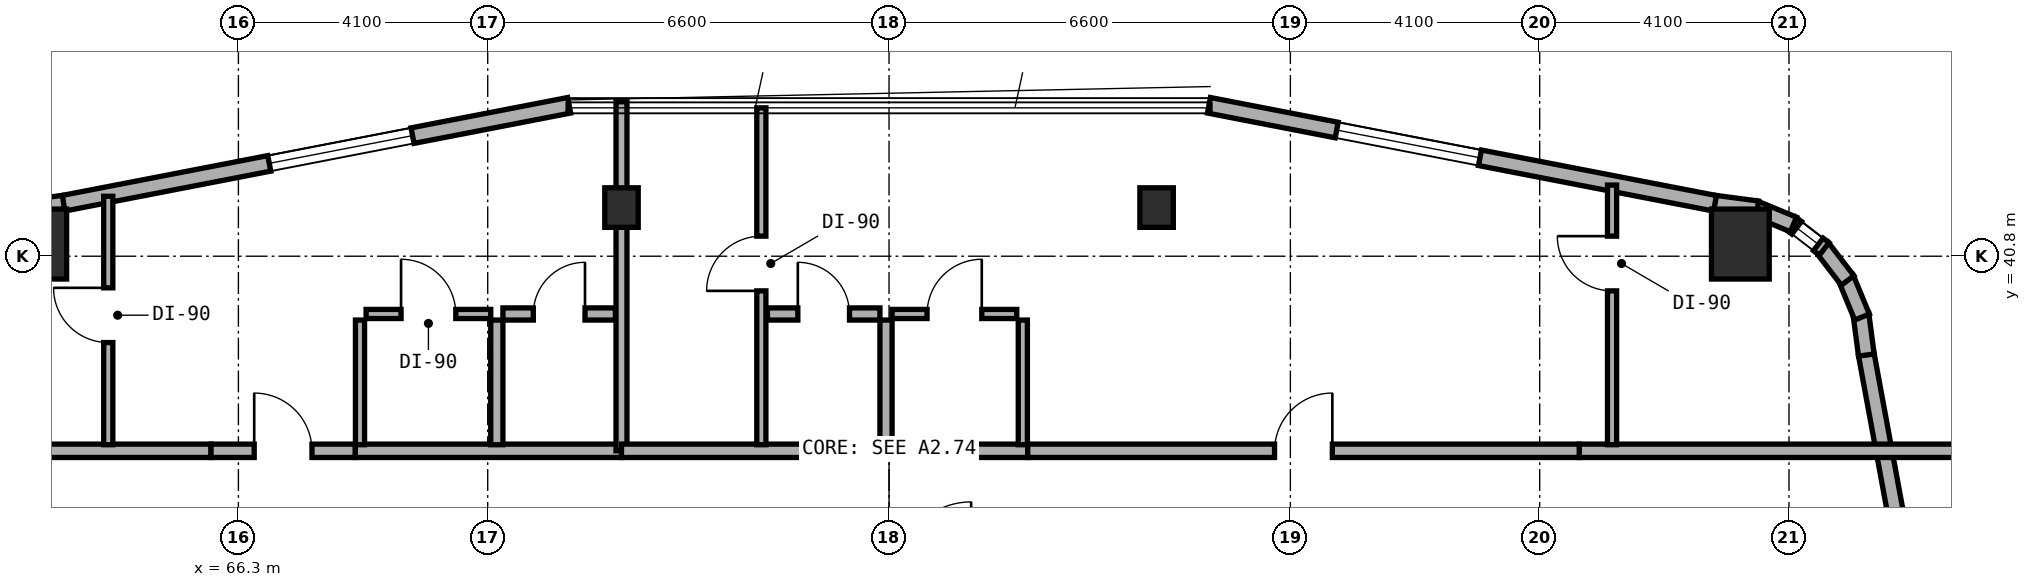
"""IFC4 building model, lengths in metres.
Left out: names, types, materials, properties, quantities, classifications, styles, units other than length and angle.
Written with IfcOpenShell. Run it as: python <this file> out.ifc"""

import sys

from ifc_helpers import new_model, si_unit, direction, frame, frame_2d, origin, origin_2d, place, context, subcontext, project, spatial, rectangle, extrude, element, fill, save


model = new_model("IFC4")
c1 = context("Model", 3, precision=1e-05, world=origin(), true_north=direction((0.0, 1.0)))
c2 = subcontext(c1, "Body", "Model", "MODEL_VIEW")
j1 = project(units=[si_unit("LENGTHUNIT", "METRE"), si_unit("PLANEANGLEUNIT", "RADIAN")], contexts=[c1])
p1 = place(None, origin())
s1 = spatial("IfcSite", under=j1, at=p1, CompositionType="ELEMENT")
p2 = place(p1, origin())
s2 = spatial("IfcBuilding", under=s1, at=p2, CompositionType="ELEMENT")
p3 = place(p2, frame((0.0, 0.0, 127.5)))
s3 = spatial("IfcBuildingStorey", under=s2, at=p3, CompositionType="ELEMENT", Elevation=127.5)
for number, where, z_axis, x_axis in (
    (1, (72.6, 41.6, 0.0), (0.0, 0.0, 1.0), (1.0, 0.0, 0.0)),
    (2, (81.4, 41.6, 0.0), (0.0, 0.0, 1.0), (1.0, 0.0, 0.0)),
):
    element("IfcColumn", number, at=place(p3, frame(where, z_axis=z_axis, x_axis=x_axis)), inside=s3, PredefinedType="COLUMN", context=c2, shape_type="SweptSolid", body=[
        extrude(rectangle(XDim=0.55, YDim=0.65, at=origin_2d()), origin(), (0.0, 0.0, 1.0), 3.24),
    ])
for number, where, z_axis, x_axis in (
    (3, (91.0, 41.0, 0.0), (0.0, 0.0, 1.0), (1.0, 0.0, 0.0)),
    (4, (63.0, 41.0, 0.0), (0.0, 0.0, 1.0), (1.0, 0.0, 0.0)),
):
    element("IfcColumn", number, at=place(p3, frame(where, z_axis=z_axis, x_axis=x_axis)), inside=s3, PredefinedType="COLUMN", context=c2, shape_type="SweptSolid", body=[
        extrude(rectangle(XDim=0.95, YDim=1.15, at=origin_2d()), origin(), (0.0, 0.0, 1.0), 3.24),
    ])
p4 = place(p3, frame((94.682, 30.442, 0.0), z_axis=(0.0, 0.0, 1.0), x_axis=(-0.181209963057, 0.983444431215, 0.0)))
e5 = element("IfcWall", 5, at=p4, inside=s3, PredefinedType="STANDARD", context=c2, shape_type="SweptSolid", body=[
    extrude(rectangle(XDim=8.889, YDim=0.26, at=frame_2d((4.445, 0.0))), origin(), (0.0, 0.0, 1.0), 3.25),
])
p5 = place(p4, frame((1.444, 0.0, 0.8)))
e6 = element("IfcOpeningElement", 6, at=p5, cuts=e5, PredefinedType="OPENING", context=c2, shape_type="SweptSolid", body=[
    extrude(rectangle(XDim=2.4, YDim=1.6, at=frame_2d((1.2, 0.8))), frame((0.0, 0.14, 0.0), z_axis=(0.0, -1.0, 0.0), x_axis=(1.0, 0.0, 0.0)), (0.0, 0.0, 1.0), 0.28),
])
p6 = place(p3, frame((93.072, 39.175, 0.0), z_axis=(0.0, 0.0, 1.0), x_axis=(-0.131667498923, 0.991293937098, 0.0)))
e7 = element("IfcWall", 7, at=p6, inside=s3, PredefinedType="STANDARD", context=c2, shape_type="SweptSolid", body=[
    extrude(rectangle(XDim=0.677, YDim=0.26, at=frame_2d((0.338, 0.0))), origin(), (0.0, 0.0, 1.0), 3.25),
])
p7 = place(p3, frame((93.001, 39.8, 0.0), z_axis=(0.0, 0.0, 1.0), x_axis=(-0.381988976935, 0.924166879681, 0.0)))
e8 = element("IfcWall", 8, at=p7, inside=s3, PredefinedType="STANDARD", context=c2, shape_type="SweptSolid", body=[
    extrude(rectangle(XDim=0.693, YDim=0.26, at=frame_2d((0.347, 0.0))), origin(), (0.0, 0.0, 1.0), 3.25),
])
p8 = place(p3, frame((92.764, 40.401, 0.0), z_axis=(0.0, 0.0, 1.0), x_axis=(-0.609472651958, 0.792807092876, 0.0)))
e9 = element("IfcWall", 9, at=p8, inside=s3, PredefinedType="STANDARD", context=c2, shape_type="SweptSolid", body=[
    extrude(rectangle(XDim=0.694, YDim=0.26, at=frame_2d((0.347, 0.0))), origin(), (0.0, 0.0, 1.0), 3.25),
])
p9 = place(p3, frame((92.379, 40.92, 0.0), z_axis=(0.0, 0.0, 1.0), x_axis=(-0.792506234191, 0.609863811657, 0.0)))
e10 = element("IfcWall", 10, at=p9, inside=s3, PredefinedType="STANDARD", context=c2, shape_type="SweptSolid", body=[
    extrude(rectangle(XDim=0.694, YDim=0.26, at=frame_2d((0.347, 0.0))), origin(), (0.0, 0.0, 1.0), 3.25),
])
p10 = place(p9, frame((0.122, 0.0, 0.85)))
e11 = element("IfcOpeningElement", 11, at=p10, cuts=e10, PredefinedType="OPENING", context=c2, shape_type="SweptSolid", body=[
    extrude(rectangle(XDim=0.45, YDim=1.5, at=frame_2d((0.225, 0.75))), frame((0.0, 0.14, 0.0), z_axis=(0.0, -1.0, 0.0), x_axis=(1.0, 0.0, 0.0)), (0.0, 0.0, 1.0), 0.28),
])
p11 = place(p3, frame((91.873, 41.322, 0.0), z_axis=(0.0, 0.0, 1.0), x_axis=(-0.92421822618, 0.381864727877, 0.0)))
e12 = element("IfcWall", 12, at=p11, inside=s3, PredefinedType="STANDARD", context=c2, shape_type="SweptSolid", body=[
    extrude(rectangle(XDim=0.694, YDim=0.26, at=frame_2d((0.347, 0.0))), origin(), (0.0, 0.0, 1.0), 3.25),
])
p12 = place(p3, frame((91.281, 41.579, 0.0), z_axis=(0.0, 0.0, 1.0), x_axis=(-0.991433279471, 0.130614135366, 0.0)))
e13 = element("IfcWall", 13, at=p12, inside=s3, PredefinedType="STANDARD", context=c2, shape_type="SweptSolid", body=[
    extrude(rectangle(XDim=0.712, YDim=0.26, at=frame_2d((0.356, 0.0))), origin(), (0.0, 0.0, 1.0), 3.25),
])
p13 = place(p3, frame((90.583, 41.67, 0.0), z_axis=(0.0, 0.0, 1.0), x_axis=(-0.981750199588, 0.190175039396, 0.0)))
e14 = element("IfcWall", 14, at=p13, inside=s3, PredefinedType="STANDARD", context=c2, shape_type="SweptSolid", body=[
    extrude(rectangle(XDim=8.477, YDim=0.26, at=frame_2d((4.238, 0.0))), origin(), (0.0, 0.0, 1.0), 3.25),
])
p14 = place(p13, frame((3.937, 0.0, 0.8)))
e15 = element("IfcOpeningElement", 15, at=p14, cuts=e14, PredefinedType="OPENING", context=c2, shape_type="SweptSolid", body=[
    extrude(rectangle(XDim=2.4, YDim=1.6, at=frame_2d((1.2, 0.8))), frame((0.0, 0.14, 0.0), z_axis=(0.0, -1.0, 0.0), x_axis=(1.0, 0.0, 0.0)), (0.0, 0.0, 1.0), 0.28),
])
p15 = place(p3, frame((71.739, 43.282, 0.0), z_axis=(0.0, 0.0, 1.0), x_axis=(-0.981750199588, -0.190175039396, 0.0)))
e16 = element("IfcWall", 16, at=p15, inside=s3, PredefinedType="STANDARD", context=c2, shape_type="SweptSolid", body=[
    extrude(rectangle(XDim=8.477, YDim=0.26, at=frame_2d((4.238, 0.0))), origin(), (0.0, 0.0, 1.0), 3.25),
])
p16 = place(p15, frame((2.623, 0.0, 0.8)))
e17 = element("IfcOpeningElement", 17, at=p16, cuts=e16, PredefinedType="OPENING", context=c2, shape_type="SweptSolid", body=[
    extrude(rectangle(XDim=2.4, YDim=1.6, at=frame_2d((1.2, 0.8))), frame((0.0, 0.14, 0.0), z_axis=(0.0, -1.0, 0.0), x_axis=(1.0, 0.0, 0.0)), (0.0, 0.0, 1.0), 0.28),
])
p17 = place(p3, frame((63.425, 41.672, 0.0), z_axis=(0.0, 0.0, 1.0), x_axis=(-0.991300187529, -0.13162043232, 0.0)))
e18 = element("IfcWall", 18, at=p17, inside=s3, PredefinedType="STANDARD", context=c2, shape_type="SweptSolid", body=[
    extrude(rectangle(XDim=0.677, YDim=0.26, at=frame_2d((0.338, 0.0))), origin(), (0.0, 0.0, 1.0), 3.25),
])
p18 = place(p3, frame((59.36, 37.6, 0.0), z_axis=(0.0, 0.0, 1.0), x_axis=(1.0, 0.0, 0.0)))
e19 = element("IfcWall", 19, at=p18, inside=s3, PredefinedType="SOLIDWALL", context=c2, shape_type="SweptSolid", body=[
    extrude(rectangle(XDim=6.49, YDim=0.22, at=frame_2d((3.245, 0.0))), origin(), (0.0, 0.0, 1.0), 2.815),
])
p19 = place(p3, frame((68.22, 37.6, 0.0), z_axis=(0.0, 0.0, 1.0), x_axis=(1.0, 0.0, 0.0)))
e20 = element("IfcWall", 20, at=p19, inside=s3, PredefinedType="SOLIDWALL", context=c2, shape_type="SweptSolid", body=[
    extrude(rectangle(XDim=4.38, YDim=0.22, at=frame_2d((2.19, 0.0))), origin(), (0.0, 0.0, 1.0), 3.22),
])
p20 = place(p3, frame((65.85, 37.6, 0.0), z_axis=(0.0, 0.0, 1.0), x_axis=(1.0, 0.0, 0.0)))
e21 = element("IfcWall", 21, at=p20, inside=s3, PredefinedType="SOLIDWALL", context=c2, shape_type="SweptSolid", body=[
    extrude(rectangle(XDim=2.37, YDim=0.22, at=frame_2d((1.185, 0.0))), origin(), (0.0, 0.0, 1.0), 3.22),
])
p21 = place(p20, frame((0.71, 0.0, 0.0)))
e22 = element("IfcOpeningElement", 22, at=p21, cuts=e21, PredefinedType="OPENING", context=c2, shape_type="SweptSolid", body=[
    extrude(rectangle(XDim=0.95, YDim=2.1, at=frame_2d((0.475, 1.05))), frame((0.0, 0.12, 0.0), z_axis=(0.0, -1.0, 0.0), x_axis=(1.0, 0.0, 0.0)), (0.0, 0.0, 1.0), 0.24),
])
p22 = place(p3, frame((64.16, 37.7, 0.0), z_axis=(0.0, 0.0, 1.0), x_axis=(0.0, 1.0, 0.0)))
e23 = element("IfcWall", 23, at=p22, inside=s3, PredefinedType="PARTITIONING", context=c2, shape_type="SweptSolid", body=[
    extrude(rectangle(XDim=4.086, YDim=0.15, at=frame_2d((2.043, 0.0))), origin(), (0.0, 0.0, 1.0), 3.22),
])
p23 = place(p22, frame((1.68, 0.0, 0.0)))
e24 = element("IfcOpeningElement", 24, at=p23, cuts=e23, PredefinedType="OPENING", context=c2, shape_type="SweptSolid", body=[
    extrude(rectangle(XDim=0.9, YDim=2.1, at=frame_2d((0.45, 1.05))), frame((0.0, 0.085, 0.0), z_axis=(0.0, -1.0, 0.0), x_axis=(1.0, 0.0, 0.0)), (0.0, 0.0, 1.0), 0.17),
])
p24 = place(p3, frame((70.55, 37.7, 0.0), z_axis=(0.0, 0.0, 1.0), x_axis=(0.0, 1.0, 0.0)))
e25 = element("IfcWall", 25, at=p24, inside=s3, PredefinedType="PLUMBINGWALL", context=c2, shape_type="SweptSolid", body=[
    extrude(rectangle(XDim=2.05, YDim=0.2, at=frame_2d((1.025, 0.0))), origin(), (0.0, 0.0, 1.0), 3.22),
])
p25 = place(p3, frame((68.3, 37.7, 0.0), z_axis=(0.0, 0.0, 1.0), x_axis=(0.0, 1.0, 0.0)))
e26 = element("IfcWall", 26, at=p25, inside=s3, PredefinedType="PARTITIONING", context=c2, shape_type="SweptSolid", body=[
    extrude(rectangle(XDim=2.05, YDim=0.15, at=frame_2d((1.025, 0.0))), origin(), (0.0, 0.0, 1.0), 3.22),
])
p26 = place(p3, frame((70.65, 39.85, 0.0), z_axis=(0.0, 0.0, 1.0), x_axis=(1.0, 0.0, 0.0)))
e27 = element("IfcWall", 27, at=p26, inside=s3, PredefinedType="PLUMBINGWALL", context=c2, shape_type="SweptSolid", body=[
    extrude(rectangle(XDim=1.85, YDim=0.2, at=frame_2d((0.925, 0.0))), origin(), (0.0, 0.0, 1.0), 3.22),
])
p27 = place(p26, frame((0.5, 0.0, 0.0)))
e28 = element("IfcOpeningElement", 28, at=p27, cuts=e27, PredefinedType="OPENING", context=c2, shape_type="SweptSolid", body=[
    extrude(rectangle(XDim=0.85, YDim=2.1, at=frame_2d((0.425, 1.05))), frame((0.0, 0.11, 0.0), z_axis=(0.0, -1.0, 0.0), x_axis=(1.0, 0.0, 0.0)), (0.0, 0.0, 1.0), 0.22),
])
p28 = place(p3, frame((68.4, 39.85, 0.0), z_axis=(0.0, 0.0, 1.0), x_axis=(1.0, 0.0, 0.0)))
e29 = element("IfcWall", 29, at=p28, inside=s3, PredefinedType="PARTITIONING", context=c2, shape_type="SweptSolid", body=[
    extrude(rectangle(XDim=2.05, YDim=0.15, at=frame_2d((1.025, 0.0))), origin(), (0.0, 0.0, 1.0), 3.22),
])
p29 = place(p28, frame((0.575, 0.0, 0.0)))
e30 = element("IfcOpeningElement", 30, at=p29, cuts=e29, PredefinedType="OPENING", context=c2, shape_type="SweptSolid", body=[
    extrude(rectangle(XDim=0.9, YDim=2.1, at=frame_2d((0.45, 1.05))), frame((0.0, 0.085, 0.0), z_axis=(0.0, -1.0, 0.0), x_axis=(1.0, 0.0, 0.0)), (0.0, 0.0, 1.0), 0.17),
])
p30 = place(p3, frame((72.6, 37.6, 0.0), z_axis=(0.0, 0.0, 1.0), x_axis=(0.0, 1.0, 0.0)))
e31 = element("IfcWall", 31, at=p30, inside=s3, PredefinedType="SOLIDWALL", context=c2, shape_type="SweptSolid", body=[
    extrude(rectangle(XDim=5.74, YDim=0.18, at=frame_2d((2.87, 0.0))), origin(), (0.0, 0.0, 1.0), 3.22),
])
p31 = place(p3, frame((72.6, 37.6, 0.0), z_axis=(0.0, 0.0, 1.0), x_axis=(1.0, 0.0, 0.0)))
e32 = element("IfcWall", 32, at=p31, inside=s3, PredefinedType="SOLIDWALL", context=c2, shape_type="SweptSolid", body=[
    extrude(rectangle(XDim=6.68, YDim=0.22, at=frame_2d((3.34, 0.0))), origin(), (0.0, 0.0, 1.0), 3.22),
])
p32 = place(p3, frame((88.35, 37.6, 0.0), z_axis=(0.0, 0.0, 1.0), x_axis=(1.0, 0.0, 0.0)))
e33 = element("IfcWall", 33, at=p32, inside=s3, PredefinedType="SOLIDWALL", context=c2, shape_type="SweptSolid", body=[
    extrude(rectangle(XDim=6.29, YDim=0.22, at=frame_2d((3.145, 0.0))), origin(), (0.0, 0.0, 1.0), 2.815),
])
p33 = place(p3, frame((79.28, 37.6, 0.0), z_axis=(0.0, 0.0, 1.0), x_axis=(1.0, 0.0, 0.0)))
e34 = element("IfcWall", 34, at=p33, inside=s3, PredefinedType="SOLIDWALL", context=c2, shape_type="SweptSolid", body=[
    extrude(rectangle(XDim=9.07, YDim=0.22, at=frame_2d((4.535, 0.0))), origin(), (0.0, 0.0, 1.0), 3.22),
])
p34 = place(p33, frame((4.06, 0.0, 0.0)))
e35 = element("IfcOpeningElement", 35, at=p34, cuts=e34, PredefinedType="OPENING", context=c2, shape_type="SweptSolid", body=[
    extrude(rectangle(XDim=0.95, YDim=2.1, at=frame_2d((0.475, 1.05))), frame((0.0, 0.12, 0.0), z_axis=(0.0, -1.0, 0.0), x_axis=(1.0, 0.0, 0.0)), (0.0, 0.0, 1.0), 0.24),
])
p35 = place(p3, frame((74.9, 37.7, 0.0), z_axis=(0.0, 0.0, 1.0), x_axis=(0.0, 1.0, 0.0)))
e36 = element("IfcWall", 36, at=p35, inside=s3, PredefinedType="PARTITIONING", context=c2, shape_type="SweptSolid", body=[
    extrude(rectangle(XDim=5.54, YDim=0.15, at=frame_2d((2.77, 0.0))), origin(), (0.0, 0.0, 1.0), 3.22),
])
p36 = place(p35, frame((2.53, 0.0, 0.0)))
e37 = element("IfcOpeningElement", 37, at=p36, cuts=e36, PredefinedType="OPENING", context=c2, shape_type="SweptSolid", body=[
    extrude(rectangle(XDim=0.9, YDim=2.1, at=frame_2d((0.45, 1.05))), frame((0.0, 0.085, 0.0), z_axis=(0.0, -1.0, 0.0), x_axis=(1.0, 0.0, 0.0)), (0.0, 0.0, 1.0), 0.17),
])
p37 = place(p3, frame((88.89, 37.7, 0.0), z_axis=(0.0, 0.0, 1.0), x_axis=(0.0, 1.0, 0.0)))
e38 = element("IfcWall", 38, at=p37, inside=s3, PredefinedType="PARTITIONING", context=c2, shape_type="SweptSolid", body=[
    extrude(rectangle(XDim=4.27, YDim=0.15, at=frame_2d((2.135, 0.0))), origin(), (0.0, 0.0, 1.0), 3.22),
])
p38 = place(p37, frame((2.53, 0.0, 0.0)))
e39 = element("IfcOpeningElement", 39, at=p38, cuts=e38, PredefinedType="OPENING", context=c2, shape_type="SweptSolid", body=[
    extrude(rectangle(XDim=0.9, YDim=2.1, at=frame_2d((0.45, 1.05))), frame((0.0, 0.085, 0.0), z_axis=(0.0, -1.0, 0.0), x_axis=(1.0, 0.0, 0.0)), (0.0, 0.0, 1.0), 0.17),
])
p39 = place(p3, frame((76.95, 37.7, 0.0), z_axis=(0.0, 0.0, 1.0), x_axis=(0.0, 1.0, 0.0)))
e40 = element("IfcWall", 40, at=p39, inside=s3, PredefinedType="PLUMBINGWALL", context=c2, shape_type="SweptSolid", body=[
    extrude(rectangle(XDim=2.05, YDim=0.2, at=frame_2d((1.025, 0.0))), origin(), (0.0, 0.0, 1.0), 3.22),
])
p40 = place(p3, frame((79.2, 37.7, 0.0), z_axis=(0.0, 0.0, 1.0), x_axis=(0.0, 1.0, 0.0)))
e41 = element("IfcWall", 41, at=p40, inside=s3, PredefinedType="PARTITIONING", context=c2, shape_type="SweptSolid", body=[
    extrude(rectangle(XDim=2.05, YDim=0.15, at=frame_2d((1.025, 0.0))), origin(), (0.0, 0.0, 1.0), 3.22),
])
p41 = place(p3, frame((75.0, 39.85, 0.0), z_axis=(0.0, 0.0, 1.0), x_axis=(1.0, 0.0, 0.0)))
e42 = element("IfcWall", 42, at=p41, inside=s3, PredefinedType="PLUMBINGWALL", context=c2, shape_type="SweptSolid", body=[
    extrude(rectangle(XDim=1.85, YDim=0.2, at=frame_2d((0.925, 0.0))), origin(), (0.0, 0.0, 1.0), 3.22),
])
p42 = place(p41, frame((0.5, 0.0, 0.0)))
e43 = element("IfcOpeningElement", 43, at=p42, cuts=e42, PredefinedType="OPENING", context=c2, shape_type="SweptSolid", body=[
    extrude(rectangle(XDim=0.85, YDim=2.1, at=frame_2d((0.425, 1.05))), frame((0.0, 0.11, 0.0), z_axis=(0.0, -1.0, 0.0), x_axis=(1.0, 0.0, 0.0)), (0.0, 0.0, 1.0), 0.22),
])
p43 = place(p3, frame((77.05, 39.85, 0.0), z_axis=(0.0, 0.0, 1.0), x_axis=(1.0, 0.0, 0.0)))
e44 = element("IfcWall", 44, at=p43, inside=s3, PredefinedType="PARTITIONING", context=c2, shape_type="SweptSolid", body=[
    extrude(rectangle(XDim=2.05, YDim=0.15, at=frame_2d((1.025, 0.0))), origin(), (0.0, 0.0, 1.0), 3.22),
])
p44 = place(p43, frame((0.575, 0.0, 0.0)))
e45 = element("IfcOpeningElement", 45, at=p44, cuts=e44, PredefinedType="OPENING", context=c2, shape_type="SweptSolid", body=[
    extrude(rectangle(XDim=0.9, YDim=2.1, at=frame_2d((0.45, 1.05))), frame((0.0, 0.085, 0.0), z_axis=(0.0, -1.0, 0.0), x_axis=(1.0, 0.0, 0.0)), (0.0, 0.0, 1.0), 0.17),
])
p45 = place(p14, origin())
e46 = element("IfcWindow", 46, at=p45, inside=s3, PartitioningType="SINGLE_PANEL", PredefinedType="WINDOW", context=c2, shape_type="SweptSolid", body=[
    extrude(rectangle(XDim=2.4, YDim=1.6, at=frame_2d((1.2, 0.8))), frame((0.0, 0.03, 0.0), z_axis=(0.0, -1.0, 0.0), x_axis=(1.0, 0.0, 0.0)), (0.0, 0.0, 1.0), 0.06),
])
fill(e15, e46)
p46 = place(p16, origin())
e47 = element("IfcWindow", 47, at=p46, inside=s3, PartitioningType="SINGLE_PANEL", PredefinedType="WINDOW", context=c2, shape_type="SweptSolid", body=[
    extrude(rectangle(XDim=2.4, YDim=1.6, at=frame_2d((1.2, 0.8))), frame((0.0, 0.03, 0.0), z_axis=(0.0, -1.0, 0.0), x_axis=(1.0, 0.0, 0.0)), (0.0, 0.0, 1.0), 0.06),
])
fill(e17, e47)
p47 = place(p10, origin())
e48 = element("IfcWindow", 48, at=p47, inside=s3, PartitioningType="SINGLE_PANEL", PredefinedType="WINDOW", context=c2, shape_type="SweptSolid", body=[
    extrude(rectangle(XDim=0.45, YDim=1.5, at=frame_2d((0.225, 0.75))), frame((0.0, 0.03, 0.0), z_axis=(0.0, -1.0, 0.0), x_axis=(1.0, 0.0, 0.0)), (0.0, 0.0, 1.0), 0.06),
])
fill(e11, e48)
p48 = place(p21, origin())
e49 = element("IfcDoor", 49, at=p48, inside=s3, OperationType="SINGLE_SWING_LEFT", PredefinedType="DOOR", context=c2, shape_type="SweptSolid", body=[
    extrude(rectangle(XDim=0.95, YDim=2.1, at=frame_2d((0.475, 1.05))), frame((0.0, 0.025, 0.0), z_axis=(0.0, -1.0, 0.0), x_axis=(1.0, 0.0, 0.0)), (0.0, 0.0, 1.0), 0.05),
])
fill(e22, e49)
p49 = place(p23, origin())
e50 = element("IfcDoor", 50, at=p49, inside=s3, OperationType="SINGLE_SWING_RIGHT", PredefinedType="DOOR", context=c2, shape_type="SweptSolid", body=[
    extrude(rectangle(XDim=0.9, YDim=2.1, at=frame_2d((0.45, 1.05))), frame((0.0, 0.025, 0.0), z_axis=(0.0, -1.0, 0.0), x_axis=(1.0, 0.0, 0.0)), (0.0, 0.0, 1.0), 0.05),
])
fill(e24, e50)
p50 = place(p27, origin())
e51 = element("IfcDoor", 51, at=p50, inside=s3, OperationType="SINGLE_SWING_RIGHT", PredefinedType="DOOR", context=c2, shape_type="SweptSolid", body=[
    extrude(rectangle(XDim=0.85, YDim=2.1, at=frame_2d((0.425, 1.05))), frame((0.0, 0.025, 0.0), z_axis=(0.0, -1.0, 0.0), x_axis=(1.0, 0.0, 0.0)), (0.0, 0.0, 1.0), 0.05),
])
fill(e28, e51)
p51 = place(p29, origin())
e52 = element("IfcDoor", 52, at=p51, inside=s3, OperationType="SINGLE_SWING_LEFT", PredefinedType="DOOR", context=c2, shape_type="SweptSolid", body=[
    extrude(rectangle(XDim=0.9, YDim=2.1, at=frame_2d((0.45, 1.05))), frame((0.0, 0.025, 0.0), z_axis=(0.0, -1.0, 0.0), x_axis=(1.0, 0.0, 0.0)), (0.0, 0.0, 1.0), 0.05),
])
fill(e30, e52)
p52 = place(p34, origin())
e53 = element("IfcDoor", 53, at=p52, inside=s3, OperationType="SINGLE_SWING_RIGHT", PredefinedType="DOOR", context=c2, shape_type="SweptSolid", body=[
    extrude(rectangle(XDim=0.95, YDim=2.1, at=frame_2d((0.475, 1.05))), frame((0.0, 0.025, 0.0), z_axis=(0.0, -1.0, 0.0), x_axis=(1.0, 0.0, 0.0)), (0.0, 0.0, 1.0), 0.05),
])
fill(e35, e53)
p53 = place(p36, origin())
e54 = element("IfcDoor", 54, at=p53, inside=s3, OperationType="SINGLE_SWING_LEFT", PredefinedType="DOOR", context=c2, shape_type="SweptSolid", body=[
    extrude(rectangle(XDim=0.9, YDim=2.1, at=frame_2d((0.45, 1.05))), frame((0.0, 0.025, 0.0), z_axis=(0.0, -1.0, 0.0), x_axis=(1.0, 0.0, 0.0)), (0.0, 0.0, 1.0), 0.05),
])
fill(e37, e54)
p54 = place(p38, origin())
e55 = element("IfcDoor", 55, at=p54, inside=s3, OperationType="SINGLE_SWING_RIGHT", PredefinedType="DOOR", context=c2, shape_type="SweptSolid", body=[
    extrude(rectangle(XDim=0.9, YDim=2.1, at=frame_2d((0.45, 1.05))), frame((0.0, 0.025, 0.0), z_axis=(0.0, -1.0, 0.0), x_axis=(1.0, 0.0, 0.0)), (0.0, 0.0, 1.0), 0.05),
])
fill(e39, e55)
p55 = place(p42, origin())
e56 = element("IfcDoor", 56, at=p55, inside=s3, OperationType="SINGLE_SWING_LEFT", PredefinedType="DOOR", context=c2, shape_type="SweptSolid", body=[
    extrude(rectangle(XDim=0.85, YDim=2.1, at=frame_2d((0.425, 1.05))), frame((0.0, 0.025, 0.0), z_axis=(0.0, -1.0, 0.0), x_axis=(1.0, 0.0, 0.0)), (0.0, 0.0, 1.0), 0.05),
])
fill(e43, e56)
p56 = place(p44, origin())
e57 = element("IfcDoor", 57, at=p56, inside=s3, OperationType="SINGLE_SWING_RIGHT", PredefinedType="DOOR", context=c2, shape_type="SweptSolid", body=[
    extrude(rectangle(XDim=0.9, YDim=2.1, at=frame_2d((0.45, 1.05))), frame((0.0, 0.025, 0.0), z_axis=(0.0, -1.0, 0.0), x_axis=(1.0, 0.0, 0.0)), (0.0, 0.0, 1.0), 0.05),
])
fill(e45, e57)
save(model, sys.argv[1])
